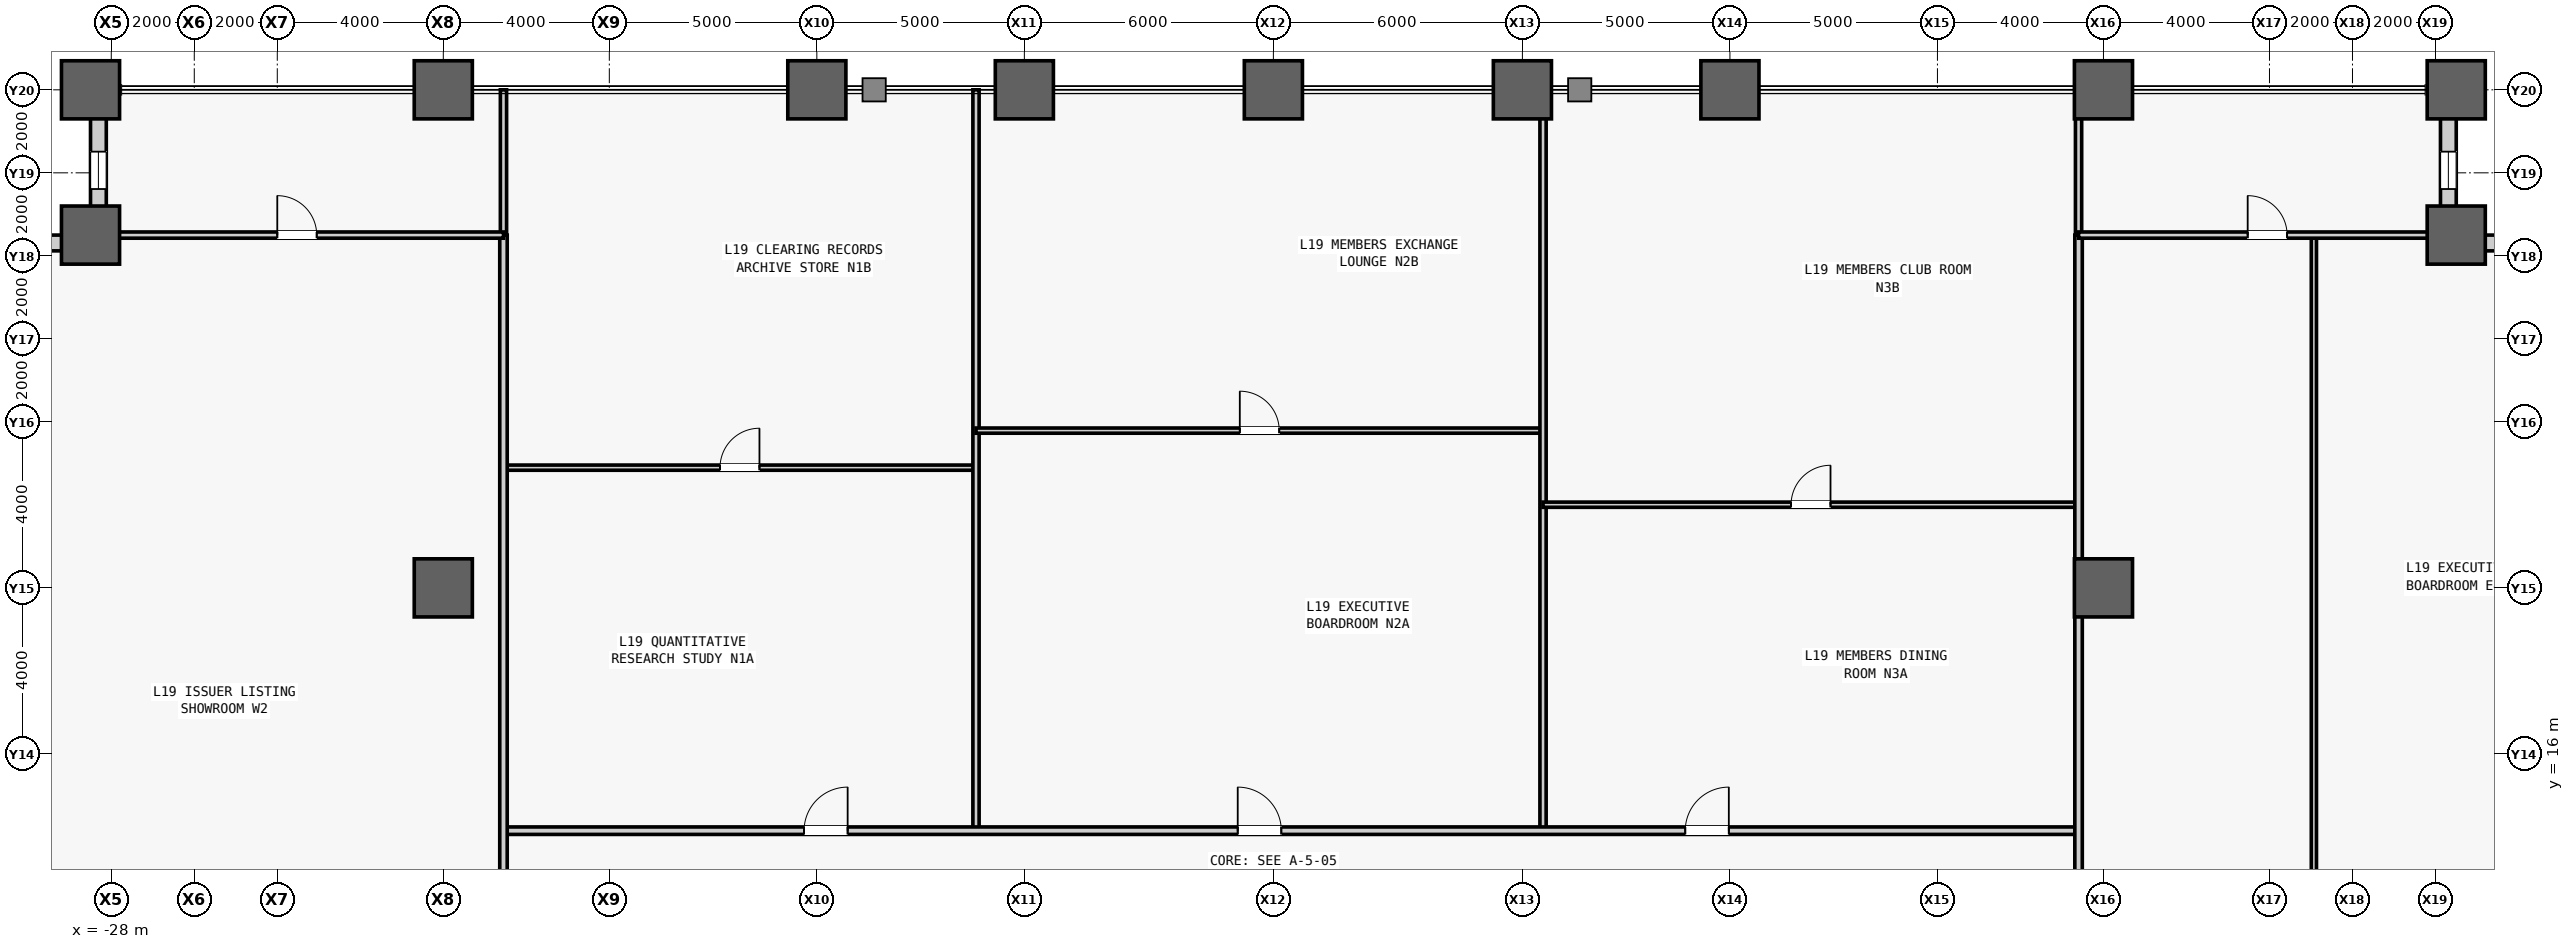
"""IFC4 building model, lengths in metres.
Left out: names, types, materials, properties, quantities, classifications, styles, units other than length and angle.
Written with IfcOpenShell. Run it as: python <this file> out.ifc"""

import sys

from ifc_helpers import new_model, si_unit, direction, frame, frame_2d, origin, origin_2d, place, context, subcontext, project, spatial, rectangle, hollow_rectangle, extrude, source, transform, mapped, element, fill, save


model = new_model("IFC4")
c1 = context("Model", 3, precision=1e-05, world=origin(), true_north=direction((0.0, 1.0)))
c2 = subcontext(c1, "Body", "Model", "MODEL_VIEW")
j1 = project(units=[si_unit("LENGTHUNIT", "METRE"), si_unit("PLANEANGLEUNIT", "RADIAN")], contexts=[c1])
p1 = place(None, origin())
s1 = spatial("IfcSite", under=j1, at=p1, CompositionType="ELEMENT")
p2 = place(p1, origin())
s2 = spatial("IfcBuilding", under=s1, at=p2, CompositionType="ELEMENT")
p3 = place(p2, frame((0.0, 0.0, 87.2)))
s3 = spatial("IfcBuildingStorey", under=s2, at=p3, CompositionType="ELEMENT", Elevation=87.2)
m1 = source(origin(), c2, "Body", "SweptSolid", [
    extrude(hollow_rectangle(XDim=1.4, YDim=1.4, WallThickness=0.075, at=origin_2d()), origin(), (0.0, 0.0, 1.0), 4.2),
])
for number, where, z_axis, x_axis in (
    (1, (-28.5, 28.5, 0.0), (0.0, 0.0, 1.0), (1.0, 0.0, 0.0)),
    (2, (-28.5, 32.0, 0.0), (0.0, 0.0, 1.0), (1.0, 0.0, 0.0)),
    (3, (-20.0, 20.0, 0.0), (0.0, 0.0, 1.0), (1.0, 0.0, 0.0)),
    (4, (-20.0, 32.0, 0.0), (0.0, 0.0, 1.0), (1.0, 0.0, 0.0)),
    (5, (-11.0, 32.0, 0.0), (0.0, 0.0, 1.0), (1.0, 0.0, 0.0)),
    (6, (-6.0, 32.0, 0.0), (0.0, 0.0, 1.0), (1.0, 0.0, 0.0)),
    (7, (0.0, 32.0, 0.0), (0.0, 0.0, 1.0), (1.0, 0.0, 0.0)),
    (8, (6.0, 32.0, 0.0), (0.0, 0.0, 1.0), (1.0, 0.0, 0.0)),
    (9, (11.0, 32.0, 0.0), (0.0, 0.0, 1.0), (1.0, 0.0, 0.0)),
    (10, (20.0, 20.0, 0.0), (0.0, 0.0, 1.0), (1.0, 0.0, 0.0)),
    (11, (20.0, 32.0, 0.0), (0.0, 0.0, 1.0), (1.0, 0.0, 0.0)),
    (12, (28.5, 28.5, 0.0), (0.0, 0.0, 1.0), (1.0, 0.0, 0.0)),
    (13, (28.5, 32.0, 0.0), (0.0, 0.0, 1.0), (1.0, 0.0, 0.0)),
):
    element("IfcColumn", number, at=place(p3, frame(where, z_axis=z_axis, x_axis=x_axis)), inside=s3, PredefinedType="COLUMN", context=c2, shape_type="MappedRepresentation", body=[
        mapped(m1, transform((0.0, 0.0, 0.0), scale=1.0)),
    ])
m2 = source(origin(), c2, "Body", "SweptSolid", [
    extrude(rectangle(XDim=3.12, YDim=0.38, at=frame_2d((1.56, 0.0))), origin(), (0.0, 0.0, 1.0), 3.245),
])
p4 = place(p3, frame((28.5, 28.31, 0.0), z_axis=(0.0, 0.0, 1.0), x_axis=(1.0, 0.0, 0.0)))
e14 = element("IfcWall", 14, at=p4, inside=s3, PredefinedType="STANDARD", context=c2, shape_type="MappedRepresentation", body=[
    mapped(m2, transform((0.0, 0.0, 0.0), scale=1.0)),
])
m3 = source(origin(), c2, "Body", "SweptSolid", [
    extrude(rectangle(XDim=0.9, YDim=2.4, at=frame_2d((0.45, 1.2))), frame((0.0, 0.2, 0.0), z_axis=(0.0, -1.0, 0.0), x_axis=(1.0, 0.0, 0.0)), (0.0, 0.0, 1.0), 0.4),
])
p5 = place(p4, frame((1.11, 0.0, 0.5)))
e15 = element("IfcOpeningElement", 15, at=p5, cuts=e14, PredefinedType="OPENING", context=c2, shape_type="MappedRepresentation", body=[
    mapped(m3, transform((0.0, 0.0, 0.0), scale=1.0)),
])
m4 = source(origin(), c2, "Body", "SweptSolid", [
    extrude(rectangle(XDim=3.12, YDim=0.38, at=frame_2d((1.56, 0.0))), origin(), (0.0, 0.0, 1.0), 2.54),
])
p6 = place(p3, frame((28.31, 28.5, 0.0), z_axis=(0.0, 0.0, 1.0), x_axis=(0.0, 1.0, 0.0)))
e16 = element("IfcWall", 16, at=p6, inside=s3, PredefinedType="STANDARD", context=c2, shape_type="MappedRepresentation", body=[
    mapped(m4, transform((0.0, 0.0, 0.0), scale=1.0)),
])
m5 = source(origin(), c2, "Body", "SweptSolid", [
    extrude(rectangle(XDim=0.9, YDim=1.82, at=frame_2d((0.45, 0.91))), frame((0.0, 0.2, 0.0), z_axis=(0.0, -1.0, 0.0), x_axis=(1.0, 0.0, 0.0)), (0.0, 0.0, 1.0), 0.4),
])
p7 = place(p6, frame((1.11, 0.0, 0.5)))
e17 = element("IfcOpeningElement", 17, at=p7, cuts=e16, PredefinedType="OPENING", context=c2, shape_type="MappedRepresentation", body=[
    mapped(m5, transform((0.0, 0.0, 0.0), scale=1.0)),
])
p8 = place(p3, frame((-28.31, 28.5, 0.0), z_axis=(0.0, 0.0, 1.0), x_axis=(0.0, 1.0, 0.0)))
e18 = element("IfcWall", 18, at=p8, inside=s3, PredefinedType="STANDARD", context=c2, shape_type="MappedRepresentation", body=[
    mapped(m4, transform((0.0, 0.0, 0.0), scale=1.0)),
])
p9 = place(p8, frame((1.11, 0.0, 0.5)))
e19 = element("IfcOpeningElement", 19, at=p9, cuts=e18, PredefinedType="OPENING", context=c2, shape_type="MappedRepresentation", body=[
    mapped(m5, transform((0.0, 0.0, 0.0), scale=1.0)),
])
p10 = place(p3, frame((-28.5, 28.31, 0.0), z_axis=(0.0, 0.0, 1.0), x_axis=(-1.0, 0.0, 0.0)))
e20 = element("IfcWall", 20, at=p10, inside=s3, PredefinedType="STANDARD", context=c2, shape_type="MappedRepresentation", body=[
    mapped(m2, transform((0.0, 0.0, 0.0), scale=1.0)),
])
p11 = place(p10, frame((1.11, 0.0, 0.5)))
e21 = element("IfcOpeningElement", 21, at=p11, cuts=e20, PredefinedType="OPENING", context=c2, shape_type="MappedRepresentation", body=[
    mapped(m3, transform((0.0, 0.0, 0.0), scale=1.0)),
])
m6 = source(origin(), c2, "Body", "SweptSolid", [
    extrude(rectangle(XDim=11.385, YDim=0.125, at=frame_2d((5.692, 0.0))), origin(), (0.0, 0.0, 1.0), 3.94),
])
p12 = place(p3, frame((-18.55, 22.896, 0.0), z_axis=(0.0, 0.0, 1.0), x_axis=(1.0, 0.0, 0.0)))
e22 = element("IfcWall", 22, at=p12, inside=s3, PredefinedType="PARTITIONING", context=c2, shape_type="MappedRepresentation", body=[
    mapped(m6, transform((0.0, 0.0, 0.0), scale=1.0)),
])
m7 = source(origin(), c2, "Body", "SweptSolid", [
    extrude(rectangle(XDim=0.95, YDim=2.15, at=frame_2d((0.475, 1.075))), frame((0.0, 0.073, 0.0), z_axis=(0.0, -1.0, 0.0), x_axis=(1.0, 0.0, 0.0)), (0.0, 0.0, 1.0), 0.145),
])
p13 = place(p12, frame((5.218, 0.0, 0.0)))
e23 = element("IfcOpeningElement", 23, at=p13, cuts=e22, PredefinedType="OPENING", context=c2, shape_type="MappedRepresentation", body=[
    mapped(m7, transform((0.0, 0.0, 0.0), scale=1.0)),
])
m8 = source(origin(), c2, "Body", "SweptSolid", [
    extrude(rectangle(XDim=17.85, YDim=0.15, at=frame_2d((8.925, 0.0))), origin(), (0.0, 0.0, 1.0), 3.94),
])
p14 = place(p3, frame((-7.165, 14.15, 0.0), z_axis=(0.0, 0.0, 1.0), x_axis=(0.0, 1.0, 0.0)))
e24 = element("IfcWall", 24, at=p14, inside=s3, PredefinedType="PARTITIONING", context=c2, shape_type="MappedRepresentation", body=[
    mapped(m8, transform((0.0, 0.0, 0.0), scale=1.0)),
])
m9 = source(origin(), c2, "Body", "SweptSolid", [
    extrude(rectangle(XDim=13.662, YDim=0.125, at=frame_2d((6.831, 0.0))), origin(), (0.0, 0.0, 1.0), 3.94),
])
p15 = place(p3, frame((-7.165, 23.789, 0.0), z_axis=(0.0, 0.0, 1.0), x_axis=(1.0, 0.0, 0.0)))
e25 = element("IfcWall", 25, at=p15, inside=s3, PredefinedType="PARTITIONING", context=c2, shape_type="MappedRepresentation", body=[
    mapped(m9, transform((0.0, 0.0, 0.0), scale=1.0)),
])
p16 = place(p15, frame((6.356, 0.0, 0.0)))
e26 = element("IfcOpeningElement", 26, at=p16, cuts=e25, PredefinedType="OPENING", context=c2, shape_type="MappedRepresentation", body=[
    mapped(m7, transform((0.0, 0.0, 0.0), scale=1.0)),
])
p17 = place(p3, frame((6.497, 14.15, 0.0), z_axis=(0.0, 0.0, 1.0), x_axis=(0.0, 1.0, 0.0)))
e27 = element("IfcWall", 27, at=p17, inside=s3, PredefinedType="PARTITIONING", context=c2, shape_type="MappedRepresentation", body=[
    mapped(m8, transform((0.0, 0.0, 0.0), scale=1.0)),
])
m10 = source(origin(), c2, "Body", "SweptSolid", [
    extrude(rectangle(XDim=12.903, YDim=0.125, at=frame_2d((6.451, 0.0))), origin(), (0.0, 0.0, 1.0), 3.94),
])
p18 = place(p3, frame((6.497, 22.004, 0.0), z_axis=(0.0, 0.0, 1.0), x_axis=(1.0, 0.0, 0.0)))
e28 = element("IfcWall", 28, at=p18, inside=s3, PredefinedType="PARTITIONING", context=c2, shape_type="MappedRepresentation", body=[
    mapped(m10, transform((0.0, 0.0, 0.0), scale=1.0)),
])
p19 = place(p18, frame((5.977, 0.0, 0.0)))
e29 = element("IfcOpeningElement", 29, at=p19, cuts=e28, PredefinedType="OPENING", context=c2, shape_type="MappedRepresentation", body=[
    mapped(m7, transform((0.0, 0.0, 0.0), scale=1.0)),
])
m11 = source(origin(), c2, "Body", "SweptSolid", [
    extrude(rectangle(XDim=37.95, YDim=0.18, at=frame_2d((18.975, 0.0))), origin(), (0.0, 0.0, 1.0), 3.94),
])
p20 = place(p3, frame((-18.55, 14.15, 0.0), z_axis=(0.0, 0.0, 1.0), x_axis=(1.0, 0.0, 0.0)))
e30 = element("IfcWall", 30, at=p20, inside=s3, PredefinedType="PARTITIONING", context=c2, shape_type="MappedRepresentation", body=[
    mapped(m11, transform((0.0, 0.0, 0.0), scale=1.0)),
])
m12 = source(origin(), c2, "Body", "SweptSolid", [
    extrude(rectangle(XDim=1.05, YDim=2.2, at=frame_2d((0.525, 1.1))), frame((0.0, 0.1, 0.0), z_axis=(0.0, -1.0, 0.0), x_axis=(1.0, 0.0, 0.0)), (0.0, 0.0, 1.0), 0.2),
])
p21 = place(p20, frame((7.242, 0.0, 0.0)))
e31 = element("IfcOpeningElement", 31, at=p21, cuts=e30, PredefinedType="OPENING", context=c2, shape_type="MappedRepresentation", body=[
    mapped(m12, transform((0.0, 0.0, 0.0), scale=1.0)),
])
p22 = place(p20, frame((17.691, 0.0, 0.0)))
e32 = element("IfcOpeningElement", 32, at=p22, cuts=e30, PredefinedType="OPENING", context=c2, shape_type="MappedRepresentation", body=[
    mapped(m12, transform((0.0, 0.0, 0.0), scale=1.0)),
])
p23 = place(p20, frame((28.473, 0.0, 0.0)))
e33 = element("IfcOpeningElement", 33, at=p23, cuts=e30, PredefinedType="OPENING", context=c2, shape_type="MappedRepresentation", body=[
    mapped(m12, transform((0.0, 0.0, 0.0), scale=1.0)),
])
m13 = source(origin(), c2, "Body", "SweptSolid", [
    extrude(rectangle(XDim=3.5, YDim=0.15, at=frame_2d((1.75, 0.0))), origin(), (0.0, 0.0, 1.0), 3.94),
])
for number, where, z_axis, x_axis in (
    (34, (-18.55, 28.5, 0.0), (0.0, 0.0, 1.0), (0.0, 1.0, 0.0)),
    (35, (19.4, 28.5, 0.0), (0.0, 0.0, 1.0), (0.0, 1.0, 0.0)),
):
    element("IfcWall", number, at=place(p3, frame(where, z_axis=z_axis, x_axis=x_axis)), inside=s3, PredefinedType="PARTITIONING", context=c2, shape_type="MappedRepresentation", body=[
        mapped(m13, transform((0.0, 0.0, 0.0), scale=1.0)),
    ])
m14 = source(origin(), c2, "Body", "SweptSolid", [
    extrude(rectangle(XDim=57.0, YDim=0.18, at=frame_2d((28.5, 0.0))), origin(), (0.0, 0.0, 1.0), 3.94),
])
p24 = place(p3, frame((-18.55, -28.5, 0.0), z_axis=(0.0, 0.0, 1.0), x_axis=(0.0, 1.0, 0.0)))
e36 = element("IfcWall", 36, at=p24, inside=s3, PredefinedType="PARTITIONING", context=c2, shape_type="MappedRepresentation", body=[
    mapped(m14, transform((0.0, 0.0, 0.0), scale=1.0)),
])
m15 = source(origin(), c2, "Body", "SweptSolid", [
    extrude(rectangle(XDim=0.95, YDim=2.15, at=frame_2d((0.475, 1.075))), frame((0.0, 0.1, 0.0), z_axis=(0.0, -1.0, 0.0), x_axis=(1.0, 0.0, 0.0)), (0.0, 0.0, 1.0), 0.2),
])
p25 = place(p24, frame((20.118, 0.0, 0.0)))
e37 = element("IfcOpeningElement", 37, at=p25, cuts=e36, PredefinedType="OPENING", context=c2, shape_type="MappedRepresentation", body=[
    mapped(m15, transform((0.0, 0.0, 0.0), scale=1.0)),
])
p26 = place(p24, frame((33.668, 0.0, 0.0)))
e38 = element("IfcOpeningElement", 38, at=p26, cuts=e36, PredefinedType="OPENING", context=c2, shape_type="MappedRepresentation", body=[
    mapped(m15, transform((0.0, 0.0, 0.0), scale=1.0)),
])
m16 = source(origin(), c2, "Body", "SweptSolid", [
    extrude(rectangle(XDim=19.444, YDim=0.125, at=frame_2d((9.722, 0.0))), origin(), (0.0, 0.0, 1.0), 3.94),
])
p27 = place(p3, frame((25.07, 9.056, 0.0), z_axis=(0.0, 0.0, 1.0), x_axis=(0.0, 1.0, 0.0)))
e39 = element("IfcWall", 39, at=p27, inside=s3, PredefinedType="PARTITIONING", context=c2, shape_type="MappedRepresentation", body=[
    mapped(m16, transform((0.0, 0.0, 0.0), scale=1.0)),
])
p28 = place(p27, frame((2.072, 0.0, 0.0)))
e40 = element("IfcOpeningElement", 40, at=p28, cuts=e39, PredefinedType="OPENING", context=c2, shape_type="MappedRepresentation", body=[
    mapped(m7, transform((0.0, 0.0, 0.0), scale=1.0)),
])
m17 = source(origin(), c2, "Body", "SweptSolid", [
    extrude(rectangle(XDim=57.0, YDim=0.18, at=frame_2d((28.5, 0.0))), origin(), (0.0, 0.0, 1.0), 3.471),
])
p29 = place(p3, frame((19.4, -28.5, 0.0), z_axis=(0.0, 0.0, 1.0), x_axis=(0.0, 1.0, 0.0)))
e41 = element("IfcWall", 41, at=p29, inside=s3, PredefinedType="PARTITIONING", context=c2, shape_type="MappedRepresentation", body=[
    mapped(m17, transform((0.0, 0.0, 0.0), scale=1.0)),
])
p30 = place(p29, frame((17.571, 0.0, 0.0)))
e42 = element("IfcOpeningElement", 42, at=p30, cuts=e41, PredefinedType="OPENING", context=c2, shape_type="MappedRepresentation", body=[
    mapped(m15, transform((0.0, 0.0, 0.0), scale=1.0)),
])
p31 = place(p29, frame((25.053, 0.0, 0.0)))
e43 = element("IfcOpeningElement", 43, at=p31, cuts=e41, PredefinedType="OPENING", context=c2, shape_type="MappedRepresentation", body=[
    mapped(m15, transform((0.0, 0.0, 0.0), scale=1.0)),
])
p32 = place(p29, frame((33.26, 0.0, 0.0)))
e44 = element("IfcOpeningElement", 44, at=p32, cuts=e41, PredefinedType="OPENING", context=c2, shape_type="MappedRepresentation", body=[
    mapped(m15, transform((0.0, 0.0, 0.0), scale=1.0)),
])
p33 = place(p29, frame((39.328, 0.0, 0.0)))
e45 = element("IfcOpeningElement", 45, at=p33, cuts=e41, PredefinedType="OPENING", context=c2, shape_type="MappedRepresentation", body=[
    mapped(m15, transform((0.0, 0.0, 0.0), scale=1.0)),
])
m18 = source(origin(), c2, "Body", "SweptSolid", [
    extrude(rectangle(XDim=9.95, YDim=0.15, at=frame_2d((4.975, 0.0))), origin(), (0.0, 0.0, 1.0), 3.94),
])
p34 = place(p3, frame((-28.5, 28.5, 0.0), z_axis=(0.0, 0.0, 1.0), x_axis=(1.0, 0.0, 0.0)))
e46 = element("IfcWall", 46, at=p34, inside=s3, PredefinedType="PARTITIONING", context=c2, shape_type="MappedRepresentation", body=[
    mapped(m18, transform((0.0, 0.0, 0.0), scale=1.0)),
])
m19 = source(origin(), c2, "Body", "SweptSolid", [
    extrude(rectangle(XDim=0.95, YDim=2.15, at=frame_2d((0.475, 1.075))), frame((0.0, 0.085, 0.0), z_axis=(0.0, -1.0, 0.0), x_axis=(1.0, 0.0, 0.0)), (0.0, 0.0, 1.0), 0.17),
])
p35 = place(p34, frame((4.5, 0.0, 0.0)))
e47 = element("IfcOpeningElement", 47, at=p35, cuts=e46, PredefinedType="OPENING", context=c2, shape_type="MappedRepresentation", body=[
    mapped(m19, transform((0.0, 0.0, 0.0), scale=1.0)),
])
m20 = source(origin(), c2, "Body", "SweptSolid", [
    extrude(rectangle(XDim=9.1, YDim=0.15, at=frame_2d((4.55, 0.0))), origin(), (0.0, 0.0, 1.0), 3.94),
])
p36 = place(p3, frame((19.4, 28.5, 0.0), z_axis=(0.0, 0.0, 1.0), x_axis=(1.0, 0.0, 0.0)))
e48 = element("IfcWall", 48, at=p36, inside=s3, PredefinedType="PARTITIONING", context=c2, shape_type="MappedRepresentation", body=[
    mapped(m20, transform((0.0, 0.0, 0.0), scale=1.0)),
])
p37 = place(p36, frame((4.075, 0.0, 0.0)))
e49 = element("IfcOpeningElement", 49, at=p37, cuts=e48, PredefinedType="OPENING", context=c2, shape_type="MappedRepresentation", body=[
    mapped(m19, transform((0.0, 0.0, 0.0), scale=1.0)),
])
m21 = source(origin(), c2, "Body", "SweptSolid", [
    extrude(rectangle(XDim=0.9, YDim=1.82, at=frame_2d((0.45, 0.91))), frame((0.0, 0.03, 0.0), z_axis=(0.0, -1.0, 0.0), x_axis=(1.0, 0.0, 0.0)), (0.0, 0.0, 1.0), 0.06),
])
p38 = place(p7, origin())
e50 = element("IfcWindow", 50, at=p38, inside=s3, PartitioningType="SINGLE_PANEL", PredefinedType="WINDOW", context=c2, shape_type="MappedRepresentation", body=[
    mapped(m21, transform((0.0, 0.0, 0.0), scale=1.0)),
])
fill(e17, e50)
p39 = place(p9, origin())
e51 = element("IfcWindow", 51, at=p39, inside=s3, PartitioningType="SINGLE_PANEL", PredefinedType="WINDOW", context=c2, shape_type="MappedRepresentation", body=[
    mapped(m21, transform((0.0, 0.0, 0.0), scale=1.0)),
])
fill(e19, e51)
m22 = source(origin(), c2, "Body", "SweptSolid", [
    extrude(rectangle(XDim=0.95, YDim=2.15, at=frame_2d((0.475, 1.075))), frame((0.0, 0.025, 0.0), z_axis=(0.0, -1.0, 0.0), x_axis=(1.0, 0.0, 0.0)), (0.0, 0.0, 1.0), 0.05),
])
p40 = place(p13, origin())
e52 = element("IfcDoor", 52, at=p40, inside=s3, OperationType="SINGLE_SWING_RIGHT", PredefinedType="DOOR", context=c2, shape_type="MappedRepresentation", body=[
    mapped(m22, transform((0.0, 0.0, 0.0), scale=1.0)),
])
fill(e23, e52)
p41 = place(p16, origin())
e53 = element("IfcDoor", 53, at=p41, inside=s3, OperationType="SINGLE_SWING_LEFT", PredefinedType="DOOR", context=c2, shape_type="MappedRepresentation", body=[
    mapped(m22, transform((0.0, 0.0, 0.0), scale=1.0)),
])
fill(e26, e53)
p42 = place(p19, origin())
e54 = element("IfcDoor", 54, at=p42, inside=s3, OperationType="SINGLE_SWING_RIGHT", PredefinedType="DOOR", context=c2, shape_type="MappedRepresentation", body=[
    mapped(m22, transform((0.0, 0.0, 0.0), scale=1.0)),
])
fill(e29, e54)
m23 = source(origin(), c2, "Body", "SweptSolid", [
    extrude(rectangle(XDim=1.05, YDim=2.2, at=frame_2d((0.525, 1.1))), frame((0.0, 0.025, 0.0), z_axis=(0.0, -1.0, 0.0), x_axis=(1.0, 0.0, 0.0)), (0.0, 0.0, 1.0), 0.05),
])
p43 = place(p21, origin())
e55 = element("IfcDoor", 55, at=p43, inside=s3, OperationType="SINGLE_SWING_RIGHT", PredefinedType="DOOR", context=c2, shape_type="MappedRepresentation", body=[
    mapped(m23, transform((0.0, 0.0, 0.0), scale=1.0)),
])
fill(e31, e55)
p44 = place(p22, origin())
e56 = element("IfcDoor", 56, at=p44, inside=s3, OperationType="SINGLE_SWING_LEFT", PredefinedType="DOOR", context=c2, shape_type="MappedRepresentation", body=[
    mapped(m23, transform((0.0, 0.0, 0.0), scale=1.0)),
])
fill(e32, e56)
p45 = place(p23, origin())
e57 = element("IfcDoor", 57, at=p45, inside=s3, OperationType="SINGLE_SWING_RIGHT", PredefinedType="DOOR", context=c2, shape_type="MappedRepresentation", body=[
    mapped(m23, transform((0.0, 0.0, 0.0), scale=1.0)),
])
fill(e33, e57)
p46 = place(p35, origin())
e58 = element("IfcDoor", 58, at=p46, inside=s3, OperationType="SINGLE_SWING_LEFT", PredefinedType="DOOR", context=c2, shape_type="MappedRepresentation", body=[
    mapped(m22, transform((0.0, 0.0, 0.0), scale=1.0)),
])
fill(e47, e58)
p47 = place(p37, origin())
e59 = element("IfcDoor", 59, at=p47, inside=s3, OperationType="SINGLE_SWING_LEFT", PredefinedType="DOOR", context=c2, shape_type="MappedRepresentation", body=[
    mapped(m22, transform((0.0, 0.0, 0.0), scale=1.0)),
])
fill(e49, e59)
save(model, sys.argv[1])
